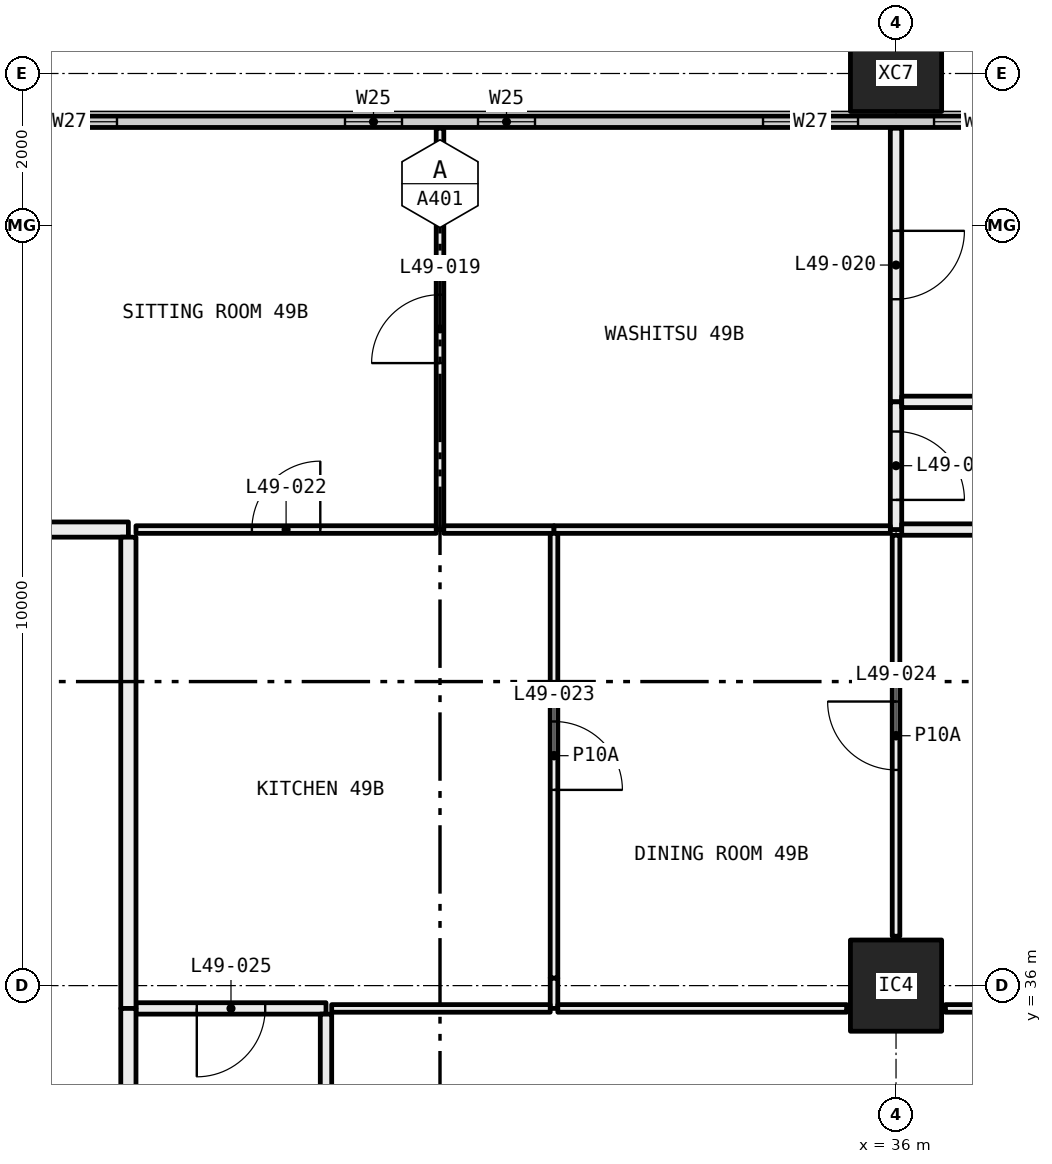
"""IFC4 building model, lengths in metres.
Left out: names, types, materials, properties, quantities, classifications, styles, units other than length and angle.
Written with IfcOpenShell. Run it as: python <this file> out.ifc"""

import sys

from ifc_helpers import new_model, si_unit, direction, frame, frame_2d, origin, origin_2d, place, context, subcontext, project, spatial, rectangle, hollow_rectangle, extrude, element, fill, save


model = new_model("IFC4")
c1 = context("Model", 3, precision=1e-05, world=origin(), true_north=direction((0.0, 1.0)))
c2 = subcontext(c1, "Body", "Model", "MODEL_VIEW")
j1 = project(units=[si_unit("LENGTHUNIT", "METRE"), si_unit("PLANEANGLEUNIT", "RADIAN")], contexts=[c1])
p1 = place(None, origin())
s1 = spatial("IfcSite", under=j1, at=p1, CompositionType="ELEMENT")
p2 = place(p1, origin())
s2 = spatial("IfcBuilding", under=s1, at=p2, CompositionType="ELEMENT")
p3 = place(p2, frame((0.0, 0.0, 185.85)))
s3 = spatial("IfcBuildingStorey", under=s2, at=p3, CompositionType="ELEMENT", Elevation=185.85)
p4 = place(p3, frame((36.0, 36.0, 0.0), z_axis=(0.0, 0.0, 1.0), x_axis=(1.0, 0.0, 0.0)))
e1 = element("IfcColumn", 1, at=p4, inside=s3, PredefinedType="COLUMN", context=c2, shape_type="SweptSolid", body=[
    extrude(hollow_rectangle(XDim=1.2, YDim=1.2, WallThickness=0.05, at=origin_2d()), origin(), (0.0, 0.0, 1.0), 3.05),
])
p5 = place(p3, frame((36.0, 48.0, -0.4), z_axis=(0.0, 0.0, 1.0), x_axis=(1.0, 0.0, 0.0)))
e2 = element("IfcColumn", 2, at=p5, inside=s3, PredefinedType="COLUMN", context=c2, shape_type="SweptSolid", body=[
    extrude(hollow_rectangle(XDim=1.2, YDim=1.0, WallThickness=0.045, at=origin_2d()), origin(), (0.0, 0.0, 1.0), 3.45),
])
p6 = place(p3, frame((6.56, 47.365, 0.0), z_axis=(0.0, 0.0, 1.0), x_axis=(1.0, 0.0, 0.0)))
e3 = element("IfcWall", 3, at=p6, inside=s3, PredefinedType="ELEMENTEDWALL", context=c2, shape_type="SweptSolid", body=[
    extrude(rectangle(XDim=46.88, YDim=0.15, at=frame_2d((23.44, 0.0))), origin(), (0.0, 0.0, 1.0), 3.05),
])
p7 = place(p6, frame((0.44, 0.0, 0.45)))
e4 = element("IfcOpeningElement", 4, at=p7, cuts=e3, PredefinedType="OPENING", context=c2, shape_type="SweptSolid", body=[
    extrude(rectangle(XDim=4.5, YDim=2.55, at=frame_2d((2.25, 1.275))), frame((0.0, 0.085, 0.0), z_axis=(0.0, -1.0, 0.0), x_axis=(1.0, 0.0, 0.0)), (0.0, 0.0, 1.0), 0.17),
])
p8 = place(p6, frame((5.94, 0.0, 0.45)))
e5 = element("IfcOpeningElement", 5, at=p8, cuts=e3, PredefinedType="OPENING", context=c2, shape_type="SweptSolid", body=[
    extrude(rectangle(XDim=1.25, YDim=2.55, at=frame_2d((0.625, 1.275))), frame((0.0, 0.085, 0.0), z_axis=(0.0, -1.0, 0.0), x_axis=(1.0, 0.0, 0.0)), (0.0, 0.0, 1.0), 0.17),
])
p9 = place(p6, frame((10.19, 0.0, 0.45)))
e6 = element("IfcOpeningElement", 6, at=p9, cuts=e3, PredefinedType="OPENING", context=c2, shape_type="SweptSolid", body=[
    extrude(rectangle(XDim=0.75, YDim=2.55, at=frame_2d((0.375, 1.275))), frame((0.0, 0.085, 0.0), z_axis=(0.0, -1.0, 0.0), x_axis=(1.0, 0.0, 0.0)), (0.0, 0.0, 1.0), 0.17),
])
p10 = place(p6, frame((11.94, 0.0, 0.45)))
e7 = element("IfcOpeningElement", 7, at=p10, cuts=e3, PredefinedType="OPENING", context=c2, shape_type="SweptSolid", body=[
    extrude(rectangle(XDim=0.75, YDim=2.55, at=frame_2d((0.375, 1.275))), frame((0.0, 0.085, 0.0), z_axis=(0.0, -1.0, 0.0), x_axis=(1.0, 0.0, 0.0)), (0.0, 0.0, 1.0), 0.17),
])
p11 = place(p6, frame((15.69, 0.0, 0.45)))
e8 = element("IfcOpeningElement", 8, at=p11, cuts=e3, PredefinedType="OPENING", context=c2, shape_type="SweptSolid", body=[
    extrude(rectangle(XDim=1.25, YDim=2.55, at=frame_2d((0.625, 1.275))), frame((0.0, 0.085, 0.0), z_axis=(0.0, -1.0, 0.0), x_axis=(1.0, 0.0, 0.0)), (0.0, 0.0, 1.0), 0.17),
])
p12 = place(p6, frame((17.94, 0.0, 0.45)))
e9 = element("IfcOpeningElement", 9, at=p12, cuts=e3, PredefinedType="OPENING", context=c2, shape_type="SweptSolid", body=[
    extrude(rectangle(XDim=1.25, YDim=2.55, at=frame_2d((0.625, 1.275))), frame((0.0, 0.085, 0.0), z_axis=(0.0, -1.0, 0.0), x_axis=(1.0, 0.0, 0.0)), (0.0, 0.0, 1.0), 0.17),
])
p13 = place(p6, frame((22.19, 0.0, 0.45)))
e10 = element("IfcOpeningElement", 10, at=p13, cuts=e3, PredefinedType="OPENING", context=c2, shape_type="SweptSolid", body=[
    extrude(rectangle(XDim=0.75, YDim=2.55, at=frame_2d((0.375, 1.275))), frame((0.0, 0.085, 0.0), z_axis=(0.0, -1.0, 0.0), x_axis=(1.0, 0.0, 0.0)), (0.0, 0.0, 1.0), 0.17),
])
p14 = place(p6, frame((23.94, 0.0, 0.45)))
e11 = element("IfcOpeningElement", 11, at=p14, cuts=e3, PredefinedType="OPENING", context=c2, shape_type="SweptSolid", body=[
    extrude(rectangle(XDim=0.75, YDim=2.55, at=frame_2d((0.375, 1.275))), frame((0.0, 0.085, 0.0), z_axis=(0.0, -1.0, 0.0), x_axis=(1.0, 0.0, 0.0)), (0.0, 0.0, 1.0), 0.17),
])
p15 = place(p6, frame((27.69, 0.0, 0.45)))
e12 = element("IfcOpeningElement", 12, at=p15, cuts=e3, PredefinedType="OPENING", context=c2, shape_type="SweptSolid", body=[
    extrude(rectangle(XDim=1.25, YDim=2.55, at=frame_2d((0.625, 1.275))), frame((0.0, 0.085, 0.0), z_axis=(0.0, -1.0, 0.0), x_axis=(1.0, 0.0, 0.0)), (0.0, 0.0, 1.0), 0.17),
])
p16 = place(p6, frame((29.94, 0.0, 0.45)))
e13 = element("IfcOpeningElement", 13, at=p16, cuts=e3, PredefinedType="OPENING", context=c2, shape_type="SweptSolid", body=[
    extrude(rectangle(XDim=1.25, YDim=2.55, at=frame_2d((0.625, 1.275))), frame((0.0, 0.085, 0.0), z_axis=(0.0, -1.0, 0.0), x_axis=(1.0, 0.0, 0.0)), (0.0, 0.0, 1.0), 0.17),
])
p17 = place(p6, frame((34.19, 0.0, 0.45)))
e14 = element("IfcOpeningElement", 14, at=p17, cuts=e3, PredefinedType="OPENING", context=c2, shape_type="SweptSolid", body=[
    extrude(rectangle(XDim=0.75, YDim=2.55, at=frame_2d((0.375, 1.275))), frame((0.0, 0.085, 0.0), z_axis=(0.0, -1.0, 0.0), x_axis=(1.0, 0.0, 0.0)), (0.0, 0.0, 1.0), 0.17),
])
p18 = place(p6, frame((35.94, 0.0, 0.45)))
e15 = element("IfcOpeningElement", 15, at=p18, cuts=e3, PredefinedType="OPENING", context=c2, shape_type="SweptSolid", body=[
    extrude(rectangle(XDim=0.75, YDim=2.55, at=frame_2d((0.375, 1.275))), frame((0.0, 0.085, 0.0), z_axis=(0.0, -1.0, 0.0), x_axis=(1.0, 0.0, 0.0)), (0.0, 0.0, 1.0), 0.17),
])
p19 = place(p6, frame((39.69, 0.0, 0.45)))
e16 = element("IfcOpeningElement", 16, at=p19, cuts=e3, PredefinedType="OPENING", context=c2, shape_type="SweptSolid", body=[
    extrude(rectangle(XDim=1.25, YDim=2.55, at=frame_2d((0.625, 1.275))), frame((0.0, 0.085, 0.0), z_axis=(0.0, -1.0, 0.0), x_axis=(1.0, 0.0, 0.0)), (0.0, 0.0, 1.0), 0.17),
])
p20 = place(p6, frame((41.94, 0.0, 0.45)))
e17 = element("IfcOpeningElement", 17, at=p20, cuts=e3, PredefinedType="OPENING", context=c2, shape_type="SweptSolid", body=[
    extrude(rectangle(XDim=4.5, YDim=2.55, at=frame_2d((2.25, 1.275))), frame((0.0, 0.085, 0.0), z_axis=(0.0, -1.0, 0.0), x_axis=(1.0, 0.0, 0.0)), (0.0, 0.0, 1.0), 0.17),
])
p21 = place(p3, frame((30.0, 42.0, 0.0), z_axis=(0.0, 0.0, 1.0), x_axis=(0.0, 1.0, 0.0)))
e18 = element("IfcWall", 18, at=p21, inside=s3, PredefinedType="PARTITIONING", context=c2, shape_type="SweptSolid", body=[
    extrude(rectangle(XDim=5.28, YDim=0.1, at=frame_2d((2.64, 0.0))), origin(), (0.0, 0.0, 1.0), 3.05),
])
p22 = place(p21, frame((2.19, 0.0, 0.0)))
e19 = element("IfcOpeningElement", 19, at=p22, cuts=e18, PredefinedType="OPENING", context=c2, shape_type="SweptSolid", body=[
    extrude(rectangle(XDim=0.9, YDim=2.1, at=frame_2d((0.45, 1.05))), frame((0.0, 0.06, 0.0), z_axis=(0.0, -1.0, 0.0), x_axis=(1.0, 0.0, 0.0)), (0.0, 0.0, 1.0), 0.12),
])
p23 = place(p3, frame((26.0, 42.0, 0.0), z_axis=(0.0, 0.0, 1.0), x_axis=(1.0, 0.0, 0.0)))
e20 = element("IfcWall", 20, at=p23, inside=s3, PredefinedType="PARTITIONING", context=c2, shape_type="SweptSolid", body=[
    extrude(rectangle(XDim=3.95, YDim=0.1, at=frame_2d((1.975, 0.0))), origin(), (0.0, 0.0, 1.0), 3.05),
])
p24 = place(p23, frame((1.525, 0.0, 0.0)))
e21 = element("IfcOpeningElement", 21, at=p24, cuts=e20, PredefinedType="OPENING", context=c2, shape_type="SweptSolid", body=[
    extrude(rectangle(XDim=0.9, YDim=2.1, at=frame_2d((0.45, 1.05))), frame((0.0, 0.06, 0.0), z_axis=(0.0, -1.0, 0.0), x_axis=(1.0, 0.0, 0.0)), (0.0, 0.0, 1.0), 0.12),
])
p25 = place(p3, frame((24.0, 42.0, 0.0), z_axis=(0.0, 0.0, 1.0), x_axis=(1.0, 0.0, 0.0)))
e22 = element("IfcWall", 22, at=p25, inside=s3, PredefinedType="PARTITIONING", context=c2, shape_type="SweptSolid", body=[
    extrude(rectangle(XDim=1.9, YDim=0.2, at=frame_2d((0.95, 0.0))), origin(), (0.0, 0.0, 1.0), 3.05),
])
p26 = place(p3, frame((36.0, 43.68, 0.0), z_axis=(0.0, 0.0, 1.0), x_axis=(0.0, 1.0, 0.0)))
e23 = element("IfcWall", 23, at=p26, inside=s3, PredefinedType="PARTITIONING", context=c2, shape_type="SweptSolid", body=[
    extrude(rectangle(XDim=3.6, YDim=0.15, at=frame_2d((1.8, 0.0))), origin(), (0.0, 0.0, 1.0), 2.45),
])
p27 = place(p26, frame((1.35, 0.0, 0.0)))
e24 = element("IfcOpeningElement", 24, at=p27, cuts=e23, PredefinedType="OPENING", context=c2, shape_type="SweptSolid", body=[
    extrude(rectangle(XDim=0.9, YDim=2.1, at=frame_2d((0.45, 1.05))), frame((0.0, 0.085, 0.0), z_axis=(0.0, -1.0, 0.0), x_axis=(1.0, 0.0, 0.0)), (0.0, 0.0, 1.0), 0.17),
])
p28 = place(p3, frame((36.0, 42.0, 0.0), z_axis=(0.0, 0.0, 1.0), x_axis=(0.0, 1.0, 0.0)))
e25 = element("IfcWall", 25, at=p28, inside=s3, PredefinedType="PARTITIONING", context=c2, shape_type="SweptSolid", body=[
    extrude(rectangle(XDim=1.68, YDim=0.15, at=frame_2d((0.84, 0.0))), origin(), (0.0, 0.0, 1.0), 2.45),
])
p29 = place(p28, frame((0.39, 0.0, 0.0)))
e26 = element("IfcOpeningElement", 26, at=p29, cuts=e25, PredefinedType="OPENING", context=c2, shape_type="SweptSolid", body=[
    extrude(rectangle(XDim=0.9, YDim=2.1, at=frame_2d((0.45, 1.05))), frame((0.0, 0.085, 0.0), z_axis=(0.0, -1.0, 0.0), x_axis=(1.0, 0.0, 0.0)), (0.0, 0.0, 1.0), 0.17),
])
p30 = place(p3, frame((30.05, 42.0, 0.0), z_axis=(0.0, 0.0, 1.0), x_axis=(1.0, 0.0, 0.0)))
e27 = element("IfcWall", 27, at=p30, inside=s3, PredefinedType="PARTITIONING", context=c2, shape_type="SweptSolid", body=[
    extrude(rectangle(XDim=1.45, YDim=0.1, at=frame_2d((0.725, 0.0))), origin(), (0.0, 0.0, 1.0), 3.05),
])
p31 = place(p3, frame((31.5, 42.0, 0.0), z_axis=(0.0, 0.0, 1.0), x_axis=(1.0, 0.0, 0.0)))
e28 = element("IfcWall", 28, at=p31, inside=s3, PredefinedType="PARTITIONING", context=c2, shape_type="SweptSolid", body=[
    extrude(rectangle(XDim=4.425, YDim=0.1, at=frame_2d((2.212, 0.0))), origin(), (0.0, 0.0, 1.0), 2.45),
])
for number, where, z_axis, x_axis in (
    (29, (36.075, 43.68, 0.0), (0.0, 0.0, 1.0), (1.0, 0.0, 0.0)),
    (30, (36.075, 42.0, 0.0), (0.0, 0.0, 1.0), (1.0, 0.0, 0.0)),
):
    element("IfcWall", number, at=place(p3, frame(where, z_axis=z_axis, x_axis=x_axis)), inside=s3, PredefinedType="PARTITIONING", context=c2, shape_type="SweptSolid", body=[
        extrude(rectangle(XDim=5.825, YDim=0.15, at=frame_2d((2.913, 0.0))), origin(), (0.0, 0.0, 1.0), 2.45),
    ])
p32 = place(p3, frame((31.5, 35.7, 0.0), z_axis=(0.0, 0.0, 1.0), x_axis=(0.0, 1.0, 0.0)))
e31 = element("IfcWall", 31, at=p32, inside=s3, PredefinedType="PARTITIONING", context=c2, shape_type="SweptSolid", body=[
    extrude(rectangle(XDim=0.4, YDim=0.1, at=frame_2d((0.2, 0.0))), origin(), (0.0, 0.0, 1.0), 2.45),
])
p33 = place(p3, frame((31.5, 36.1, 0.0), z_axis=(0.0, 0.0, 1.0), x_axis=(0.0, 1.0, 0.0)))
e32 = element("IfcWall", 32, at=p33, inside=s3, PredefinedType="PARTITIONING", context=c2, shape_type="SweptSolid", body=[
    extrude(rectangle(XDim=5.85, YDim=0.1, at=frame_2d((2.925, 0.0))), origin(), (0.0, 0.0, 1.0), 3.05),
])
p34 = place(p33, frame((2.475, 0.0, 0.0)))
e33 = element("IfcOpeningElement", 33, at=p34, cuts=e32, PredefinedType="OPENING", context=c2, shape_type="SweptSolid", body=[
    extrude(rectangle(XDim=0.9, YDim=2.1, at=frame_2d((0.45, 1.05))), frame((0.0, 0.06, 0.0), z_axis=(0.0, -1.0, 0.0), x_axis=(1.0, 0.0, 0.0)), (0.0, 0.0, 1.0), 0.12),
])
p35 = place(p3, frame((26.0, 35.7, 0.0), z_axis=(0.0, 0.0, 1.0), x_axis=(1.0, 0.0, 0.0)))
e34 = element("IfcWall", 34, at=p35, inside=s3, PredefinedType="PARTITIONING", context=c2, shape_type="SweptSolid", body=[
    extrude(rectangle(XDim=2.5, YDim=0.15, at=frame_2d((1.25, 0.0))), origin(), (0.0, 0.0, 1.0), 3.05),
])
p36 = place(p35, frame((0.8, 0.0, 0.0)))
e35 = element("IfcOpeningElement", 35, at=p36, cuts=e34, PredefinedType="OPENING", context=c2, shape_type="SweptSolid", body=[
    extrude(rectangle(XDim=0.9, YDim=2.1, at=frame_2d((0.45, 1.05))), frame((0.0, 0.085, 0.0), z_axis=(0.0, -1.0, 0.0), x_axis=(1.0, 0.0, 0.0)), (0.0, 0.0, 1.0), 0.17),
])
p37 = place(p3, frame((28.575, 35.7, 0.0), z_axis=(0.0, 0.0, 1.0), x_axis=(1.0, 0.0, 0.0)))
e36 = element("IfcWall", 36, at=p37, inside=s3, PredefinedType="PARTITIONING", context=c2, shape_type="SweptSolid", body=[
    extrude(rectangle(XDim=2.875, YDim=0.1, at=frame_2d((1.438, 0.0))), origin(), (0.0, 0.0, 1.0), 3.05),
])
p38 = place(p3, frame((25.9, 41.9, 0.0), z_axis=(0.0, 0.0, 1.0), x_axis=(0.0, -1.0, 0.0)))
e37 = element("IfcWall", 37, at=p38, inside=s3, PredefinedType="PARTITIONING", context=c2, shape_type="SweptSolid", body=[
    extrude(rectangle(XDim=6.2, YDim=0.2, at=frame_2d((3.1, 0.0))), origin(), (0.0, 0.0, 1.0), 2.45),
])
p39 = place(p3, frame((36.0, 36.65, 0.0), z_axis=(0.0, 0.0, 1.0), x_axis=(0.0, 1.0, 0.0)))
e38 = element("IfcWall", 38, at=p39, inside=s3, PredefinedType="PARTITIONING", context=c2, shape_type="SweptSolid", body=[
    extrude(rectangle(XDim=5.275, YDim=0.1, at=frame_2d((2.638, 0.0))), origin(), (0.0, 0.0, 1.0), 2.45),
])
p40 = place(p39, frame((2.188, 0.0, 0.0)))
e39 = element("IfcOpeningElement", 39, at=p40, cuts=e38, PredefinedType="OPENING", context=c2, shape_type="SweptSolid", body=[
    extrude(rectangle(XDim=0.9, YDim=2.1, at=frame_2d((0.45, 1.05))), frame((0.0, 0.06, 0.0), z_axis=(0.0, -1.0, 0.0), x_axis=(1.0, 0.0, 0.0)), (0.0, 0.0, 1.0), 0.12),
])
p41 = place(p3, frame((31.55, 35.7, 0.0), z_axis=(0.0, 0.0, 1.0), x_axis=(1.0, 0.0, 0.0)))
e40 = element("IfcWall", 40, at=p41, inside=s3, PredefinedType="PARTITIONING", context=c2, shape_type="SweptSolid", body=[
    extrude(rectangle(XDim=3.8, YDim=0.1, at=frame_2d((1.9, 0.0))), origin(), (0.0, 0.0, 1.0), 3.05),
])
p42 = place(p3, frame((36.65, 35.7, 0.0), z_axis=(0.0, 0.0, 1.0), x_axis=(1.0, 0.0, 0.0)))
e41 = element("IfcWall", 41, at=p42, inside=s3, PredefinedType="PARTITIONING", context=c2, shape_type="SweptSolid", body=[
    extrude(rectangle(XDim=5.25, YDim=0.1, at=frame_2d((2.625, 0.0))), origin(), (0.0, 0.0, 1.0), 3.05),
])
p43 = place(p42, frame((2.175, 0.0, 0.0)))
e42 = element("IfcOpeningElement", 42, at=p43, cuts=e41, PredefinedType="OPENING", context=c2, shape_type="SweptSolid", body=[
    extrude(rectangle(XDim=0.9, YDim=2.1, at=frame_2d((0.45, 1.05))), frame((0.0, 0.06, 0.0), z_axis=(0.0, -1.0, 0.0), x_axis=(1.0, 0.0, 0.0)), (0.0, 0.0, 1.0), 0.12),
])
p44 = place(p3, frame((28.5, 33.352, 0.0), z_axis=(0.0, 0.0, 1.0), x_axis=(0.0, 1.0, 0.0)))
e43 = element("IfcWall", 43, at=p44, inside=s3, PredefinedType="PARTITIONING", context=c2, shape_type="SweptSolid", body=[
    extrude(rectangle(XDim=2.273, YDim=0.15, at=frame_2d((1.136, 0.0))), origin(), (0.0, 0.0, 1.0), 3.05),
])
p45 = place(p3, frame((25.9, 35.7, 0.0), z_axis=(0.0, 0.0, 1.0), x_axis=(0.0, -1.0, 0.0)))
e44 = element("IfcWall", 44, at=p45, inside=s3, PredefinedType="PARTITIONING", context=c2, shape_type="SweptSolid", body=[
    extrude(rectangle(XDim=2.423, YDim=0.2, at=frame_2d((1.211, 0.0))), origin(), (0.0, 0.0, 1.0), 3.05),
])
p46 = place(p12, origin())
e45 = element("IfcWindow", 45, at=p46, inside=s3, PartitioningType="SINGLE_PANEL", PredefinedType="WINDOW", context=c2, shape_type="SweptSolid", body=[
    extrude(rectangle(XDim=1.25, YDim=2.55, at=frame_2d((0.625, 1.275))), frame((0.0, 0.03, 0.0), z_axis=(0.0, -1.0, 0.0), x_axis=(1.0, 0.0, 0.0)), (0.0, 0.0, 1.0), 0.06),
])
fill(e9, e45)
p47 = place(p13, origin())
e46 = element("IfcWindow", 46, at=p47, inside=s3, PartitioningType="SINGLE_PANEL", PredefinedType="WINDOW", context=c2, shape_type="SweptSolid", body=[
    extrude(rectangle(XDim=0.75, YDim=2.55, at=frame_2d((0.375, 1.275))), frame((0.0, 0.03, 0.0), z_axis=(0.0, -1.0, 0.0), x_axis=(1.0, 0.0, 0.0)), (0.0, 0.0, 1.0), 0.06),
])
fill(e10, e46)
p48 = place(p14, origin())
e47 = element("IfcWindow", 47, at=p48, inside=s3, PartitioningType="SINGLE_PANEL", PredefinedType="WINDOW", context=c2, shape_type="SweptSolid", body=[
    extrude(rectangle(XDim=0.75, YDim=2.55, at=frame_2d((0.375, 1.275))), frame((0.0, 0.03, 0.0), z_axis=(0.0, -1.0, 0.0), x_axis=(1.0, 0.0, 0.0)), (0.0, 0.0, 1.0), 0.06),
])
fill(e11, e47)
p49 = place(p15, origin())
e48 = element("IfcWindow", 48, at=p49, inside=s3, PartitioningType="SINGLE_PANEL", PredefinedType="WINDOW", context=c2, shape_type="SweptSolid", body=[
    extrude(rectangle(XDim=1.25, YDim=2.55, at=frame_2d((0.625, 1.275))), frame((0.0, 0.03, 0.0), z_axis=(0.0, -1.0, 0.0), x_axis=(1.0, 0.0, 0.0)), (0.0, 0.0, 1.0), 0.06),
])
fill(e12, e48)
p50 = place(p16, origin())
e49 = element("IfcWindow", 49, at=p50, inside=s3, PartitioningType="SINGLE_PANEL", PredefinedType="WINDOW", context=c2, shape_type="SweptSolid", body=[
    extrude(rectangle(XDim=1.25, YDim=2.55, at=frame_2d((0.625, 1.275))), frame((0.0, 0.03, 0.0), z_axis=(0.0, -1.0, 0.0), x_axis=(1.0, 0.0, 0.0)), (0.0, 0.0, 1.0), 0.06),
])
fill(e13, e49)
p51 = place(p22, origin())
e50 = element("IfcDoor", 50, at=p51, inside=s3, OperationType="SINGLE_SWING_RIGHT", PredefinedType="DOOR", context=c2, shape_type="SweptSolid", body=[
    extrude(rectangle(XDim=0.9, YDim=2.1, at=frame_2d((0.45, 1.05))), frame((0.0, 0.025, 0.0), z_axis=(0.0, -1.0, 0.0), x_axis=(1.0, 0.0, 0.0)), (0.0, 0.0, 1.0), 0.05),
])
fill(e19, e50)
p52 = place(p27, frame((0.9, 0.0, 0.0), x_axis=(-1.0, 0.0, 0.0)))
e51 = element("IfcDoor", 51, at=p52, inside=s3, OperationType="SINGLE_SWING_RIGHT", PredefinedType="DOOR", context=c2, shape_type="SweptSolid", body=[
    extrude(rectangle(XDim=0.9, YDim=2.1, at=frame_2d((0.45, 1.05))), frame((0.0, 0.025, 0.0), z_axis=(0.0, -1.0, 0.0), x_axis=(1.0, 0.0, 0.0)), (0.0, 0.0, 1.0), 0.05),
])
fill(e24, e51)
p53 = place(p29, frame((0.9, 0.0, 0.0), x_axis=(-1.0, 0.0, 0.0)))
e52 = element("IfcDoor", 52, at=p53, inside=s3, OperationType="SINGLE_SWING_LEFT", PredefinedType="DOOR", context=c2, shape_type="SweptSolid", body=[
    extrude(rectangle(XDim=0.9, YDim=2.1, at=frame_2d((0.45, 1.05))), frame((0.0, 0.025, 0.0), z_axis=(0.0, -1.0, 0.0), x_axis=(1.0, 0.0, 0.0)), (0.0, 0.0, 1.0), 0.05),
])
fill(e26, e52)
p54 = place(p24, origin())
e53 = element("IfcDoor", 53, at=p54, inside=s3, OperationType="SINGLE_SWING_LEFT", PredefinedType="DOOR", context=c2, shape_type="SweptSolid", body=[
    extrude(rectangle(XDim=0.9, YDim=2.1, at=frame_2d((0.45, 1.05))), frame((0.0, 0.025, 0.0), z_axis=(0.0, -1.0, 0.0), x_axis=(1.0, 0.0, 0.0)), (0.0, 0.0, 1.0), 0.05),
])
fill(e21, e53)
p55 = place(p34, frame((0.9, 0.0, 0.0), x_axis=(-1.0, 0.0, 0.0)))
e54 = element("IfcDoor", 54, at=p55, inside=s3, OperationType="SINGLE_SWING_LEFT", PredefinedType="DOOR", context=c2, shape_type="SweptSolid", body=[
    extrude(rectangle(XDim=0.9, YDim=2.1, at=frame_2d((0.45, 1.05))), frame((0.0, 0.025, 0.0), z_axis=(0.0, -1.0, 0.0), x_axis=(1.0, 0.0, 0.0)), (0.0, 0.0, 1.0), 0.05),
])
fill(e33, e54)
p56 = place(p40, origin())
e55 = element("IfcDoor", 55, at=p56, inside=s3, OperationType="SINGLE_SWING_LEFT", PredefinedType="DOOR", context=c2, shape_type="SweptSolid", body=[
    extrude(rectangle(XDim=0.9, YDim=2.1, at=frame_2d((0.45, 1.05))), frame((0.0, 0.025, 0.0), z_axis=(0.0, -1.0, 0.0), x_axis=(1.0, 0.0, 0.0)), (0.0, 0.0, 1.0), 0.05),
])
fill(e39, e55)
p57 = place(p36, frame((0.9, 0.0, 0.0), x_axis=(-1.0, 0.0, 0.0)))
e56 = element("IfcDoor", 56, at=p57, inside=s3, OperationType="SINGLE_SWING_LEFT", PredefinedType="DOOR", context=c2, shape_type="SweptSolid", body=[
    extrude(rectangle(XDim=0.9, YDim=2.1, at=frame_2d((0.45, 1.05))), frame((0.0, 0.025, 0.0), z_axis=(0.0, -1.0, 0.0), x_axis=(1.0, 0.0, 0.0)), (0.0, 0.0, 1.0), 0.05),
])
fill(e35, e56)
save(model, sys.argv[1])
